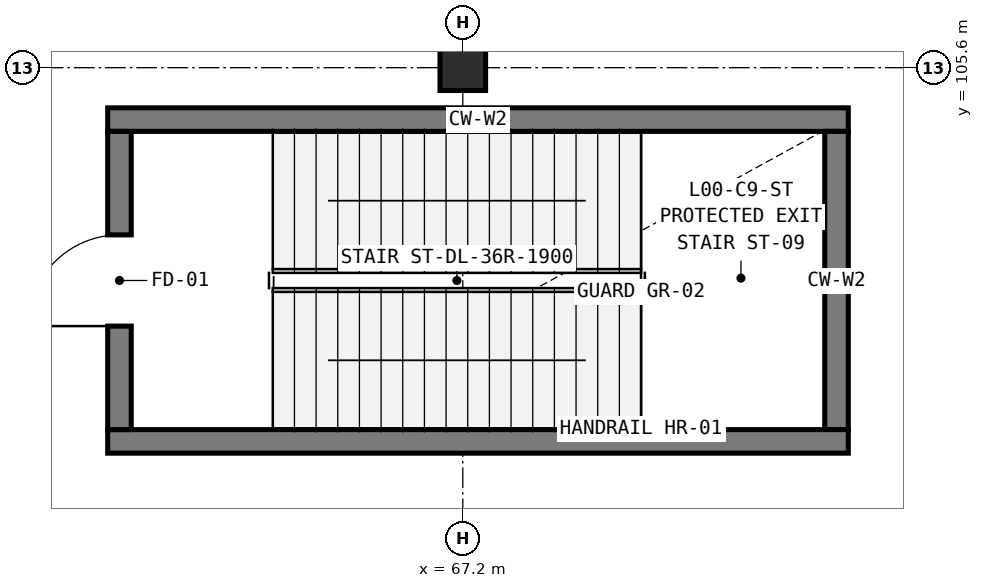
"""IFC4 building model, lengths in metres.
Left out: names, types, materials, properties, quantities, classifications, styles, units other than length and angle.
Written with IfcOpenShell. Run it as: python <this file> out.ifc"""

import sys

from ifc_helpers import new_model, si_unit, direction, frame, frame_2d, origin, origin_2d, place, context, subcontext, project, spatial, rectangle, extrude, element, fill, save


model = new_model("IFC4")
c1 = context("Model", 3, precision=1e-05, world=origin(), true_north=direction((0.0, 1.0)))
c2 = subcontext(c1, "Body", "Model", "MODEL_VIEW")
j1 = project(units=[si_unit("LENGTHUNIT", "METRE"), si_unit("PLANEANGLEUNIT", "RADIAN")], contexts=[c1])
p1 = place(None, origin())
s1 = spatial("IfcSite", under=j1, at=p1, CompositionType="ELEMENT")
p2 = place(p1, origin())
s2 = spatial("IfcBuilding", under=s1, at=p2, CompositionType="ELEMENT")
p3 = place(p2, origin())
s3 = spatial("IfcBuildingStorey", under=s2, at=p3, CompositionType="ELEMENT", Elevation=0.0)
p4 = place(p3, frame((67.2, 105.6, 0.0), z_axis=(0.0, 0.0, 1.0), x_axis=(1.0, 0.0, 0.0)))
e1 = element("IfcColumn", 1, at=p4, inside=s3, PredefinedType="COLUMN", context=c2, shape_type="SweptSolid", body=[
    extrude(rectangle(XDim=0.6, YDim=0.6, at=origin_2d()), origin(), (0.0, 0.0, 1.0), 6.0),
])
p5 = place(p3, frame((62.528, 104.917, 0.0), z_axis=(0.0, 0.0, 1.0), x_axis=(1.0, 0.0, 0.0)))
e2 = element("IfcWall", 2, at=p5, inside=s3, PredefinedType="SHEAR", context=c2, shape_type="SweptSolid", body=[
    extrude(rectangle(XDim=9.744, YDim=0.31, at=frame_2d((4.872, 0.0))), origin(), (0.0, 0.0, 1.0), 5.68),
])
p6 = place(p3, frame((72.117, 104.762, 0.0), z_axis=(0.0, 0.0, 1.0), x_axis=(0.0, -1.0, 0.0)))
e3 = element("IfcWall", 3, at=p6, inside=s3, PredefinedType="SHEAR", context=c2, shape_type="SweptSolid", body=[
    extrude(rectangle(XDim=3.924, YDim=0.31, at=frame_2d((1.962, 0.0))), origin(), (0.0, 0.0, 1.0), 5.68),
])
p7 = place(p3, frame((72.272, 100.683, 0.0), z_axis=(0.0, 0.0, 1.0), x_axis=(-1.0, 0.0, 0.0)))
e4 = element("IfcWall", 4, at=p7, inside=s3, PredefinedType="SHEAR", context=c2, shape_type="SweptSolid", body=[
    extrude(rectangle(XDim=9.744, YDim=0.31, at=frame_2d((4.872, 0.0))), origin(), (0.0, 0.0, 1.0), 5.68),
])
p8 = place(p3, frame((62.683, 100.838, 0.0), z_axis=(0.0, 0.0, 1.0), x_axis=(0.0, 1.0, 0.0)))
e5 = element("IfcWall", 5, at=p8, inside=s3, PredefinedType="SHEAR", context=c2, shape_type="SweptSolid", body=[
    extrude(rectangle(XDim=3.924, YDim=0.31, at=frame_2d((1.962, 0.0))), origin(), (0.0, 0.0, 1.0), 5.68),
])
p9 = place(p8, frame((1.362, 0.0, 0.0)))
e6 = element("IfcOpeningElement", 6, at=p9, cuts=e5, PredefinedType="OPENING", context=c2, shape_type="SweptSolid", body=[
    extrude(rectangle(XDim=1.2, YDim=2.2, at=frame_2d((0.6, 1.1))), frame((0.0, 0.165, 0.0), z_axis=(0.0, -1.0, 0.0), x_axis=(1.0, 0.0, 0.0)), (0.0, 0.0, 1.0), 0.33),
])
p10 = place(p9, origin())
e7 = element("IfcDoor", 7, at=p10, inside=s3, OperationType="SINGLE_SWING_LEFT", PredefinedType="DOOR", context=c2, shape_type="SweptSolid", body=[
    extrude(rectangle(XDim=1.2, YDim=2.2, at=frame_2d((0.6, 1.1))), frame((0.0, 0.025, 0.0), z_axis=(0.0, -1.0, 0.0), x_axis=(1.0, 0.0, 0.0)), (0.0, 0.0, 1.0), 0.05),
])
fill(e6, e7)
save(model, sys.argv[1])
